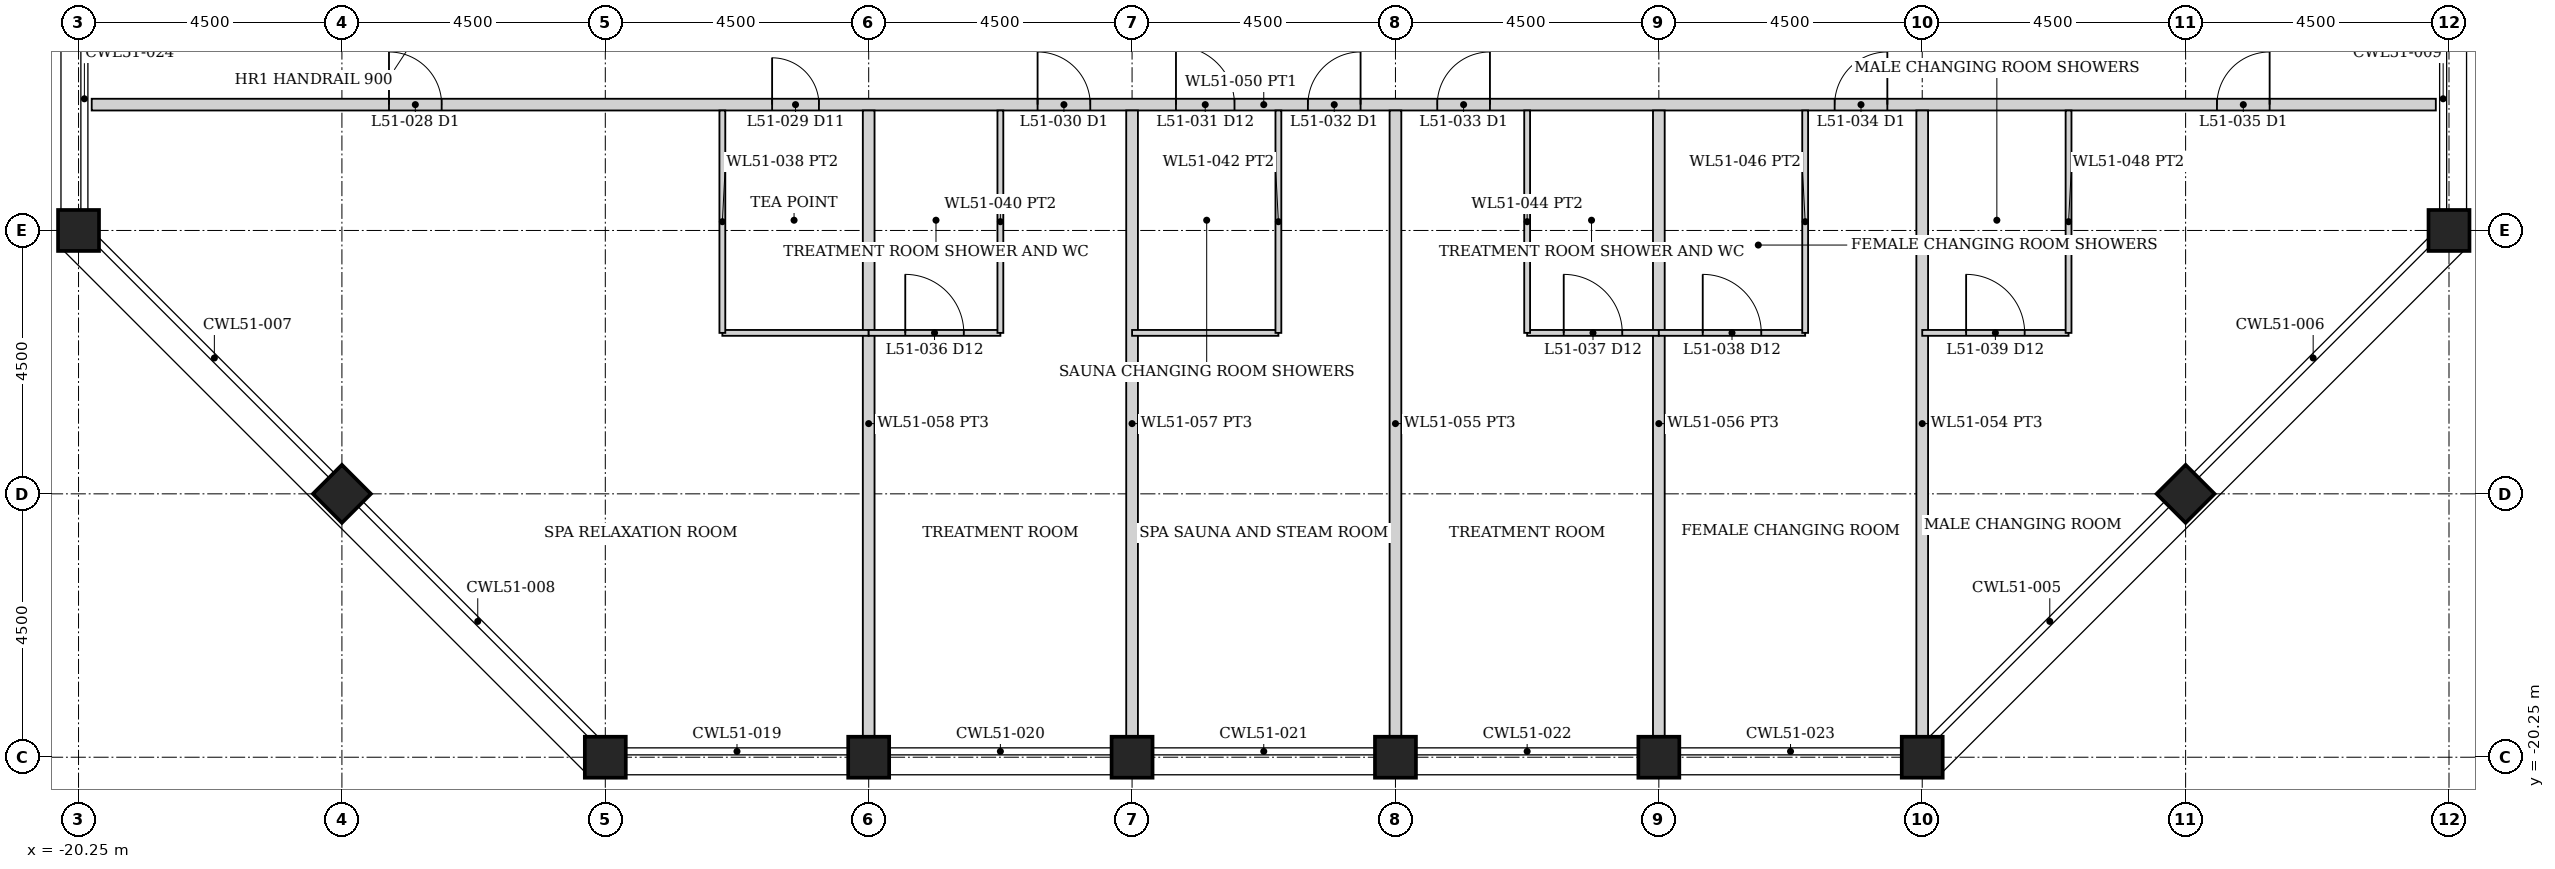
"""IFC4 building model, lengths in metres.
Left out: names, types, materials, properties, quantities, classifications, styles, units other than length and angle.
Written with IfcOpenShell. Run it as: python <this file> out.ifc"""

import sys

from ifc_helpers import new_model, si_unit, direction, frame, frame_2d, origin, origin_2d, place, context, subcontext, project, spatial, rectangle, hollow_rectangle, extrude, element, fill, save


model = new_model("IFC4")
c1 = context("Model", 3, precision=1e-05, world=origin(), true_north=direction((0.0, 1.0)))
c2 = subcontext(c1, "Body", "Model", "MODEL_VIEW")
j1 = project(units=[si_unit("LENGTHUNIT", "METRE"), si_unit("PLANEANGLEUNIT", "RADIAN")], contexts=[c1])
p1 = place(None, origin())
s1 = spatial("IfcSite", under=j1, at=p1, CompositionType="ELEMENT")
p2 = place(p1, origin())
s2 = spatial("IfcBuilding", under=s1, at=p2, CompositionType="ELEMENT")
p3 = place(p2, frame((0.0, 0.0, 195.8)))
s3 = spatial("IfcBuildingStorey", under=s2, at=p3, CompositionType="ELEMENT", Elevation=195.8)
for number, where, z_axis, x_axis in (
    (1, (-11.25, -20.25, 0.0), (0.0, 0.0, 1.0), (0.0, 1.0, 0.0)),
    (2, (20.25, -11.25, 0.0), (0.0, 0.0, 1.0), (1.0, 0.0, 0.0)),
    (3, (-20.25, -11.25, 0.0), (0.0, 0.0, 1.0), (1.0, 0.0, 0.0)),
    (4, (-6.75, -20.25, 0.0), (0.0, 0.0, 1.0), (0.0, 1.0, 0.0)),
    (5, (-2.25, -20.25, 0.0), (0.0, 0.0, 1.0), (0.0, 1.0, 0.0)),
    (6, (2.25, -20.25, 0.0), (0.0, 0.0, 1.0), (0.0, 1.0, 0.0)),
    (7, (6.75, -20.25, 0.0), (0.0, 0.0, 1.0), (0.0, 1.0, 0.0)),
    (8, (11.25, -20.25, 0.0), (0.0, 0.0, 1.0), (0.0, 1.0, 0.0)),
    (9, (15.75, -15.75, 0.0), (0.0, 0.0, 1.0), (0.707, -0.707, 0.0)),
    (10, (-15.75, -15.75, 0.0), (0.0, 0.0, 1.0), (0.707, 0.707, 0.0)),
):
    element("IfcColumn", number, at=place(p3, frame(where, z_axis=z_axis, x_axis=x_axis)), inside=s3, PredefinedType="COLUMN", context=c2, shape_type="SweptSolid", body=[
        extrude(hollow_rectangle(XDim=0.7, YDim=0.7, WallThickness=0.045, at=origin_2d()), origin(), (0.0, 0.0, 1.0), 5.0),
    ])
p4 = place(p3, frame((-20.025, -9.1, 0.0), z_axis=(0.0, 0.0, 1.0), x_axis=(1.0, 0.0, 0.0)))
e11 = element("IfcWall", 11, at=p4, inside=s3, PredefinedType="PARTITIONING", context=c2, shape_type="SweptSolid", body=[
    extrude(rectangle(XDim=40.05, YDim=0.2, at=frame_2d((20.025, 0.0))), origin(), (0.0, 0.0, 1.0), 3.873),
])
p5 = place(p4, frame((5.079, 0.0, 0.0)))
e12 = element("IfcOpeningElement", 12, at=p5, cuts=e11, PredefinedType="OPENING", context=c2, shape_type="SweptSolid", body=[
    extrude(rectangle(XDim=0.9, YDim=2.1, at=frame_2d((0.45, 1.05))), frame((0.0, 0.11, 0.0), z_axis=(0.0, -1.0, 0.0), x_axis=(1.0, 0.0, 0.0)), (0.0, 0.0, 1.0), 0.22),
])
p6 = place(p4, frame((11.625, 0.0, 0.0)))
e13 = element("IfcOpeningElement", 13, at=p6, cuts=e11, PredefinedType="OPENING", context=c2, shape_type="SweptSolid", body=[
    extrude(rectangle(XDim=0.8, YDim=2.1, at=frame_2d((0.4, 1.05))), frame((0.0, 0.11, 0.0), z_axis=(0.0, -1.0, 0.0), x_axis=(1.0, 0.0, 0.0)), (0.0, 0.0, 1.0), 0.22),
])
p7 = place(p4, frame((16.161, 0.0, 0.0)))
e14 = element("IfcOpeningElement", 14, at=p7, cuts=e11, PredefinedType="OPENING", context=c2, shape_type="SweptSolid", body=[
    extrude(rectangle(XDim=0.9, YDim=2.1, at=frame_2d((0.45, 1.05))), frame((0.0, 0.11, 0.0), z_axis=(0.0, -1.0, 0.0), x_axis=(1.0, 0.0, 0.0)), (0.0, 0.0, 1.0), 0.22),
])
p8 = place(p4, frame((20.779, 0.0, 0.0)))
e15 = element("IfcOpeningElement", 15, at=p8, cuts=e11, PredefinedType="OPENING", context=c2, shape_type="SweptSolid", body=[
    extrude(rectangle(XDim=0.9, YDim=2.1, at=frame_2d((0.45, 1.05))), frame((0.0, 0.11, 0.0), z_axis=(0.0, -1.0, 0.0), x_axis=(1.0, 0.0, 0.0)), (0.0, 0.0, 1.0), 0.22),
])
p9 = place(p4, frame((18.525, 0.0, 0.0)))
e16 = element("IfcOpeningElement", 16, at=p9, cuts=e11, PredefinedType="OPENING", context=c2, shape_type="SweptSolid", body=[
    extrude(rectangle(XDim=1.0, YDim=2.1, at=frame_2d((0.5, 1.05))), frame((0.0, 0.11, 0.0), z_axis=(0.0, -1.0, 0.0), x_axis=(1.0, 0.0, 0.0)), (0.0, 0.0, 1.0), 0.22),
])
p10 = place(p4, frame((22.989, 0.0, 0.0)))
e17 = element("IfcOpeningElement", 17, at=p10, cuts=e11, PredefinedType="OPENING", context=c2, shape_type="SweptSolid", body=[
    extrude(rectangle(XDim=0.9, YDim=2.1, at=frame_2d((0.45, 1.05))), frame((0.0, 0.11, 0.0), z_axis=(0.0, -1.0, 0.0), x_axis=(1.0, 0.0, 0.0)), (0.0, 0.0, 1.0), 0.22),
])
p11 = place(p4, frame((29.779, 0.0, 0.0)))
e18 = element("IfcOpeningElement", 18, at=p11, cuts=e11, PredefinedType="OPENING", context=c2, shape_type="SweptSolid", body=[
    extrude(rectangle(XDim=0.9, YDim=2.1, at=frame_2d((0.45, 1.05))), frame((0.0, 0.11, 0.0), z_axis=(0.0, -1.0, 0.0), x_axis=(1.0, 0.0, 0.0)), (0.0, 0.0, 1.0), 0.22),
])
p12 = place(p4, frame((36.311, 0.0, 0.0)))
e19 = element("IfcOpeningElement", 19, at=p12, cuts=e11, PredefinedType="OPENING", context=c2, shape_type="SweptSolid", body=[
    extrude(rectangle(XDim=0.9, YDim=2.1, at=frame_2d((0.45, 1.05))), frame((0.0, 0.11, 0.0), z_axis=(0.0, -1.0, 0.0), x_axis=(1.0, 0.0, 0.0)), (0.0, 0.0, 1.0), 0.22),
])
for number, where, z_axis, x_axis in (
    (20, (-6.75, -19.9, 0.0), (0.0, 0.0, 1.0), (0.0, 1.0, 0.0)),
    (21, (-2.25, -19.9, 0.0), (0.0, 0.0, 1.0), (0.0, 1.0, 0.0)),
    (22, (2.25, -19.9, 0.0), (0.0, 0.0, 1.0), (0.0, 1.0, 0.0)),
    (23, (6.75, -19.9, 0.0), (0.0, 0.0, 1.0), (0.0, 1.0, 0.0)),
    (24, (11.25, -19.9, 0.0), (0.0, 0.0, 1.0), (0.0, 1.0, 0.0)),
):
    element("IfcWall", number, at=place(p3, frame(where, z_axis=z_axis, x_axis=x_axis)), inside=s3, PredefinedType="PARTITIONING", context=c2, shape_type="SweptSolid", body=[
        extrude(rectangle(XDim=10.7, YDim=0.2, at=frame_2d((5.35, 0.0))), origin(), (0.0, 0.0, 1.0), 3.873),
    ])
p13 = place(p3, frame((-9.25, -13.0, 0.0), z_axis=(0.0, 0.0, 1.0), x_axis=(1.0, 0.0, 0.0)))
e25 = element("IfcWall", 25, at=p13, inside=s3, PredefinedType="PARTITIONING", context=c2, shape_type="SweptSolid", body=[
    extrude(rectangle(XDim=2.5, YDim=0.1, at=frame_2d((1.25, 0.0))), origin(), (0.0, 0.0, 1.0), 3.873),
])
p14 = place(p3, frame((-9.25, -13.0, 0.0), z_axis=(0.0, 0.0, 1.0), x_axis=(0.0, 1.0, 0.0)))
e26 = element("IfcWall", 26, at=p14, inside=s3, PredefinedType="PARTITIONING", context=c2, shape_type="SweptSolid", body=[
    extrude(rectangle(XDim=3.8, YDim=0.1, at=frame_2d((1.9, 0.0))), origin(), (0.0, 0.0, 1.0), 3.873),
])
p15 = place(p3, frame((-6.75, -13.0, 0.0), z_axis=(0.0, 0.0, 1.0), x_axis=(1.0, 0.0, 0.0)))
e27 = element("IfcWall", 27, at=p15, inside=s3, PredefinedType="PARTITIONING", context=c2, shape_type="SweptSolid", body=[
    extrude(rectangle(XDim=2.25, YDim=0.1, at=frame_2d((1.125, 0.0))), origin(), (0.0, 0.0, 1.0), 3.873),
])
p16 = place(p15, frame((0.625, 0.0, 0.0)))
e28 = element("IfcOpeningElement", 28, at=p16, cuts=e27, PredefinedType="OPENING", context=c2, shape_type="SweptSolid", body=[
    extrude(rectangle(XDim=1.0, YDim=2.1, at=frame_2d((0.5, 1.05))), frame((0.0, 0.06, 0.0), z_axis=(0.0, -1.0, 0.0), x_axis=(1.0, 0.0, 0.0)), (0.0, 0.0, 1.0), 0.12),
])
p17 = place(p3, frame((-4.5, -13.0, 0.0), z_axis=(0.0, 0.0, 1.0), x_axis=(0.0, 1.0, 0.0)))
e29 = element("IfcWall", 29, at=p17, inside=s3, PredefinedType="PARTITIONING", context=c2, shape_type="SweptSolid", body=[
    extrude(rectangle(XDim=3.8, YDim=0.1, at=frame_2d((1.9, 0.0))), origin(), (0.0, 0.0, 1.0), 3.873),
])
p18 = place(p3, frame((-2.25, -13.0, 0.0), z_axis=(0.0, 0.0, 1.0), x_axis=(1.0, 0.0, 0.0)))
e30 = element("IfcWall", 30, at=p18, inside=s3, PredefinedType="PARTITIONING", context=c2, shape_type="SweptSolid", body=[
    extrude(rectangle(XDim=2.5, YDim=0.1, at=frame_2d((1.25, 0.0))), origin(), (0.0, 0.0, 1.0), 3.873),
])
p19 = place(p3, frame((0.25, -13.0, 0.0), z_axis=(0.0, 0.0, 1.0), x_axis=(0.0, 1.0, 0.0)))
e31 = element("IfcWall", 31, at=p19, inside=s3, PredefinedType="PARTITIONING", context=c2, shape_type="SweptSolid", body=[
    extrude(rectangle(XDim=3.8, YDim=0.1, at=frame_2d((1.9, 0.0))), origin(), (0.0, 0.0, 1.0), 3.873),
])
p20 = place(p3, frame((4.5, -13.0, 0.0), z_axis=(0.0, 0.0, 1.0), x_axis=(1.0, 0.0, 0.0)))
e32 = element("IfcWall", 32, at=p20, inside=s3, PredefinedType="PARTITIONING", context=c2, shape_type="SweptSolid", body=[
    extrude(rectangle(XDim=2.25, YDim=0.1, at=frame_2d((1.125, 0.0))), origin(), (0.0, 0.0, 1.0), 3.873),
])
p21 = place(p20, frame((0.625, 0.0, 0.0)))
e33 = element("IfcOpeningElement", 33, at=p21, cuts=e32, PredefinedType="OPENING", context=c2, shape_type="SweptSolid", body=[
    extrude(rectangle(XDim=1.0, YDim=2.1, at=frame_2d((0.5, 1.05))), frame((0.0, 0.06, 0.0), z_axis=(0.0, -1.0, 0.0), x_axis=(1.0, 0.0, 0.0)), (0.0, 0.0, 1.0), 0.12),
])
p22 = place(p3, frame((4.5, -13.0, 0.0), z_axis=(0.0, 0.0, 1.0), x_axis=(0.0, 1.0, 0.0)))
e34 = element("IfcWall", 34, at=p22, inside=s3, PredefinedType="PARTITIONING", context=c2, shape_type="SweptSolid", body=[
    extrude(rectangle(XDim=3.8, YDim=0.1, at=frame_2d((1.9, 0.0))), origin(), (0.0, 0.0, 1.0), 3.873),
])
p23 = place(p3, frame((6.75, -13.0, 0.0), z_axis=(0.0, 0.0, 1.0), x_axis=(1.0, 0.0, 0.0)))
e35 = element("IfcWall", 35, at=p23, inside=s3, PredefinedType="PARTITIONING", context=c2, shape_type="SweptSolid", body=[
    extrude(rectangle(XDim=2.5, YDim=0.1, at=frame_2d((1.25, 0.0))), origin(), (0.0, 0.0, 1.0), 3.873),
])
p24 = place(p23, frame((0.75, 0.0, 0.0)))
e36 = element("IfcOpeningElement", 36, at=p24, cuts=e35, PredefinedType="OPENING", context=c2, shape_type="SweptSolid", body=[
    extrude(rectangle(XDim=1.0, YDim=2.1, at=frame_2d((0.5, 1.05))), frame((0.0, 0.06, 0.0), z_axis=(0.0, -1.0, 0.0), x_axis=(1.0, 0.0, 0.0)), (0.0, 0.0, 1.0), 0.12),
])
p25 = place(p3, frame((9.25, -13.0, 0.0), z_axis=(0.0, 0.0, 1.0), x_axis=(0.0, 1.0, 0.0)))
e37 = element("IfcWall", 37, at=p25, inside=s3, PredefinedType="PARTITIONING", context=c2, shape_type="SweptSolid", body=[
    extrude(rectangle(XDim=3.8, YDim=0.1, at=frame_2d((1.9, 0.0))), origin(), (0.0, 0.0, 1.0), 3.873),
])
p26 = place(p3, frame((11.25, -13.0, 0.0), z_axis=(0.0, 0.0, 1.0), x_axis=(1.0, 0.0, 0.0)))
e38 = element("IfcWall", 38, at=p26, inside=s3, PredefinedType="PARTITIONING", context=c2, shape_type="SweptSolid", body=[
    extrude(rectangle(XDim=2.5, YDim=0.1, at=frame_2d((1.25, 0.0))), origin(), (0.0, 0.0, 1.0), 3.873),
])
p27 = place(p26, frame((0.75, 0.0, 0.0)))
e39 = element("IfcOpeningElement", 39, at=p27, cuts=e38, PredefinedType="OPENING", context=c2, shape_type="SweptSolid", body=[
    extrude(rectangle(XDim=1.0, YDim=2.1, at=frame_2d((0.5, 1.05))), frame((0.0, 0.06, 0.0), z_axis=(0.0, -1.0, 0.0), x_axis=(1.0, 0.0, 0.0)), (0.0, 0.0, 1.0), 0.12),
])
p28 = place(p3, frame((13.75, -13.0, 0.0), z_axis=(0.0, 0.0, 1.0), x_axis=(0.0, 1.0, 0.0)))
e40 = element("IfcWall", 40, at=p28, inside=s3, PredefinedType="PARTITIONING", context=c2, shape_type="SweptSolid", body=[
    extrude(rectangle(XDim=3.8, YDim=0.1, at=frame_2d((1.9, 0.0))), origin(), (0.0, 0.0, 1.0), 3.873),
])
p29 = place(p5, origin())
e41 = element("IfcDoor", 41, at=p29, inside=s3, OperationType="SINGLE_SWING_LEFT", PredefinedType="DOOR", context=c2, shape_type="SweptSolid", body=[
    extrude(rectangle(XDim=0.9, YDim=2.1, at=frame_2d((0.45, 1.05))), frame((0.0, 0.025, 0.0), z_axis=(0.0, -1.0, 0.0), x_axis=(1.0, 0.0, 0.0)), (0.0, 0.0, 1.0), 0.05),
])
fill(e12, e41)
p30 = place(p6, origin())
e42 = element("IfcDoor", 42, at=p30, inside=s3, OperationType="SINGLE_SWING_LEFT", PredefinedType="DOOR", context=c2, shape_type="SweptSolid", body=[
    extrude(rectangle(XDim=0.8, YDim=2.1, at=frame_2d((0.4, 1.05))), frame((0.0, 0.025, 0.0), z_axis=(0.0, -1.0, 0.0), x_axis=(1.0, 0.0, 0.0)), (0.0, 0.0, 1.0), 0.05),
])
fill(e13, e42)
p31 = place(p7, origin())
e43 = element("IfcDoor", 43, at=p31, inside=s3, OperationType="SINGLE_SWING_LEFT", PredefinedType="DOOR", context=c2, shape_type="SweptSolid", body=[
    extrude(rectangle(XDim=0.9, YDim=2.1, at=frame_2d((0.45, 1.05))), frame((0.0, 0.025, 0.0), z_axis=(0.0, -1.0, 0.0), x_axis=(1.0, 0.0, 0.0)), (0.0, 0.0, 1.0), 0.05),
])
fill(e14, e43)
p32 = place(p16, origin())
e44 = element("IfcDoor", 44, at=p32, inside=s3, OperationType="SINGLE_SWING_LEFT", PredefinedType="DOOR", context=c2, shape_type="SweptSolid", body=[
    extrude(rectangle(XDim=1.0, YDim=2.1, at=frame_2d((0.5, 1.05))), frame((0.0, 0.025, 0.0), z_axis=(0.0, -1.0, 0.0), x_axis=(1.0, 0.0, 0.0)), (0.0, 0.0, 1.0), 0.05),
])
fill(e28, e44)
p33 = place(p8, origin())
e45 = element("IfcDoor", 45, at=p33, inside=s3, OperationType="SINGLE_SWING_RIGHT", PredefinedType="DOOR", context=c2, shape_type="SweptSolid", body=[
    extrude(rectangle(XDim=0.9, YDim=2.1, at=frame_2d((0.45, 1.05))), frame((0.0, 0.025, 0.0), z_axis=(0.0, -1.0, 0.0), x_axis=(1.0, 0.0, 0.0)), (0.0, 0.0, 1.0), 0.05),
])
fill(e15, e45)
p34 = place(p9, origin())
e46 = element("IfcDoor", 46, at=p34, inside=s3, OperationType="SINGLE_SWING_LEFT", PredefinedType="DOOR", context=c2, shape_type="SweptSolid", body=[
    extrude(rectangle(XDim=1.0, YDim=2.1, at=frame_2d((0.5, 1.05))), frame((0.0, 0.025, 0.0), z_axis=(0.0, -1.0, 0.0), x_axis=(1.0, 0.0, 0.0)), (0.0, 0.0, 1.0), 0.05),
])
fill(e16, e46)
p35 = place(p10, origin())
e47 = element("IfcDoor", 47, at=p35, inside=s3, OperationType="SINGLE_SWING_RIGHT", PredefinedType="DOOR", context=c2, shape_type="SweptSolid", body=[
    extrude(rectangle(XDim=0.9, YDim=2.1, at=frame_2d((0.45, 1.05))), frame((0.0, 0.025, 0.0), z_axis=(0.0, -1.0, 0.0), x_axis=(1.0, 0.0, 0.0)), (0.0, 0.0, 1.0), 0.05),
])
fill(e17, e47)
p36 = place(p21, origin())
e48 = element("IfcDoor", 48, at=p36, inside=s3, OperationType="SINGLE_SWING_LEFT", PredefinedType="DOOR", context=c2, shape_type="SweptSolid", body=[
    extrude(rectangle(XDim=1.0, YDim=2.1, at=frame_2d((0.5, 1.05))), frame((0.0, 0.025, 0.0), z_axis=(0.0, -1.0, 0.0), x_axis=(1.0, 0.0, 0.0)), (0.0, 0.0, 1.0), 0.05),
])
fill(e33, e48)
p37 = place(p11, origin())
e49 = element("IfcDoor", 49, at=p37, inside=s3, OperationType="SINGLE_SWING_RIGHT", PredefinedType="DOOR", context=c2, shape_type="SweptSolid", body=[
    extrude(rectangle(XDim=0.9, YDim=2.1, at=frame_2d((0.45, 1.05))), frame((0.0, 0.025, 0.0), z_axis=(0.0, -1.0, 0.0), x_axis=(1.0, 0.0, 0.0)), (0.0, 0.0, 1.0), 0.05),
])
fill(e18, e49)
p38 = place(p24, origin())
e50 = element("IfcDoor", 50, at=p38, inside=s3, OperationType="SINGLE_SWING_LEFT", PredefinedType="DOOR", context=c2, shape_type="SweptSolid", body=[
    extrude(rectangle(XDim=1.0, YDim=2.1, at=frame_2d((0.5, 1.05))), frame((0.0, 0.025, 0.0), z_axis=(0.0, -1.0, 0.0), x_axis=(1.0, 0.0, 0.0)), (0.0, 0.0, 1.0), 0.05),
])
fill(e36, e50)
p39 = place(p12, origin())
e51 = element("IfcDoor", 51, at=p39, inside=s3, OperationType="SINGLE_SWING_RIGHT", PredefinedType="DOOR", context=c2, shape_type="SweptSolid", body=[
    extrude(rectangle(XDim=0.9, YDim=2.1, at=frame_2d((0.45, 1.05))), frame((0.0, 0.025, 0.0), z_axis=(0.0, -1.0, 0.0), x_axis=(1.0, 0.0, 0.0)), (0.0, 0.0, 1.0), 0.05),
])
fill(e19, e51)
p40 = place(p27, origin())
e52 = element("IfcDoor", 52, at=p40, inside=s3, OperationType="SINGLE_SWING_LEFT", PredefinedType="DOOR", context=c2, shape_type="SweptSolid", body=[
    extrude(rectangle(XDim=1.0, YDim=2.1, at=frame_2d((0.5, 1.05))), frame((0.0, 0.025, 0.0), z_axis=(0.0, -1.0, 0.0), x_axis=(1.0, 0.0, 0.0)), (0.0, 0.0, 1.0), 0.05),
])
fill(e39, e52)
save(model, sys.argv[1])
